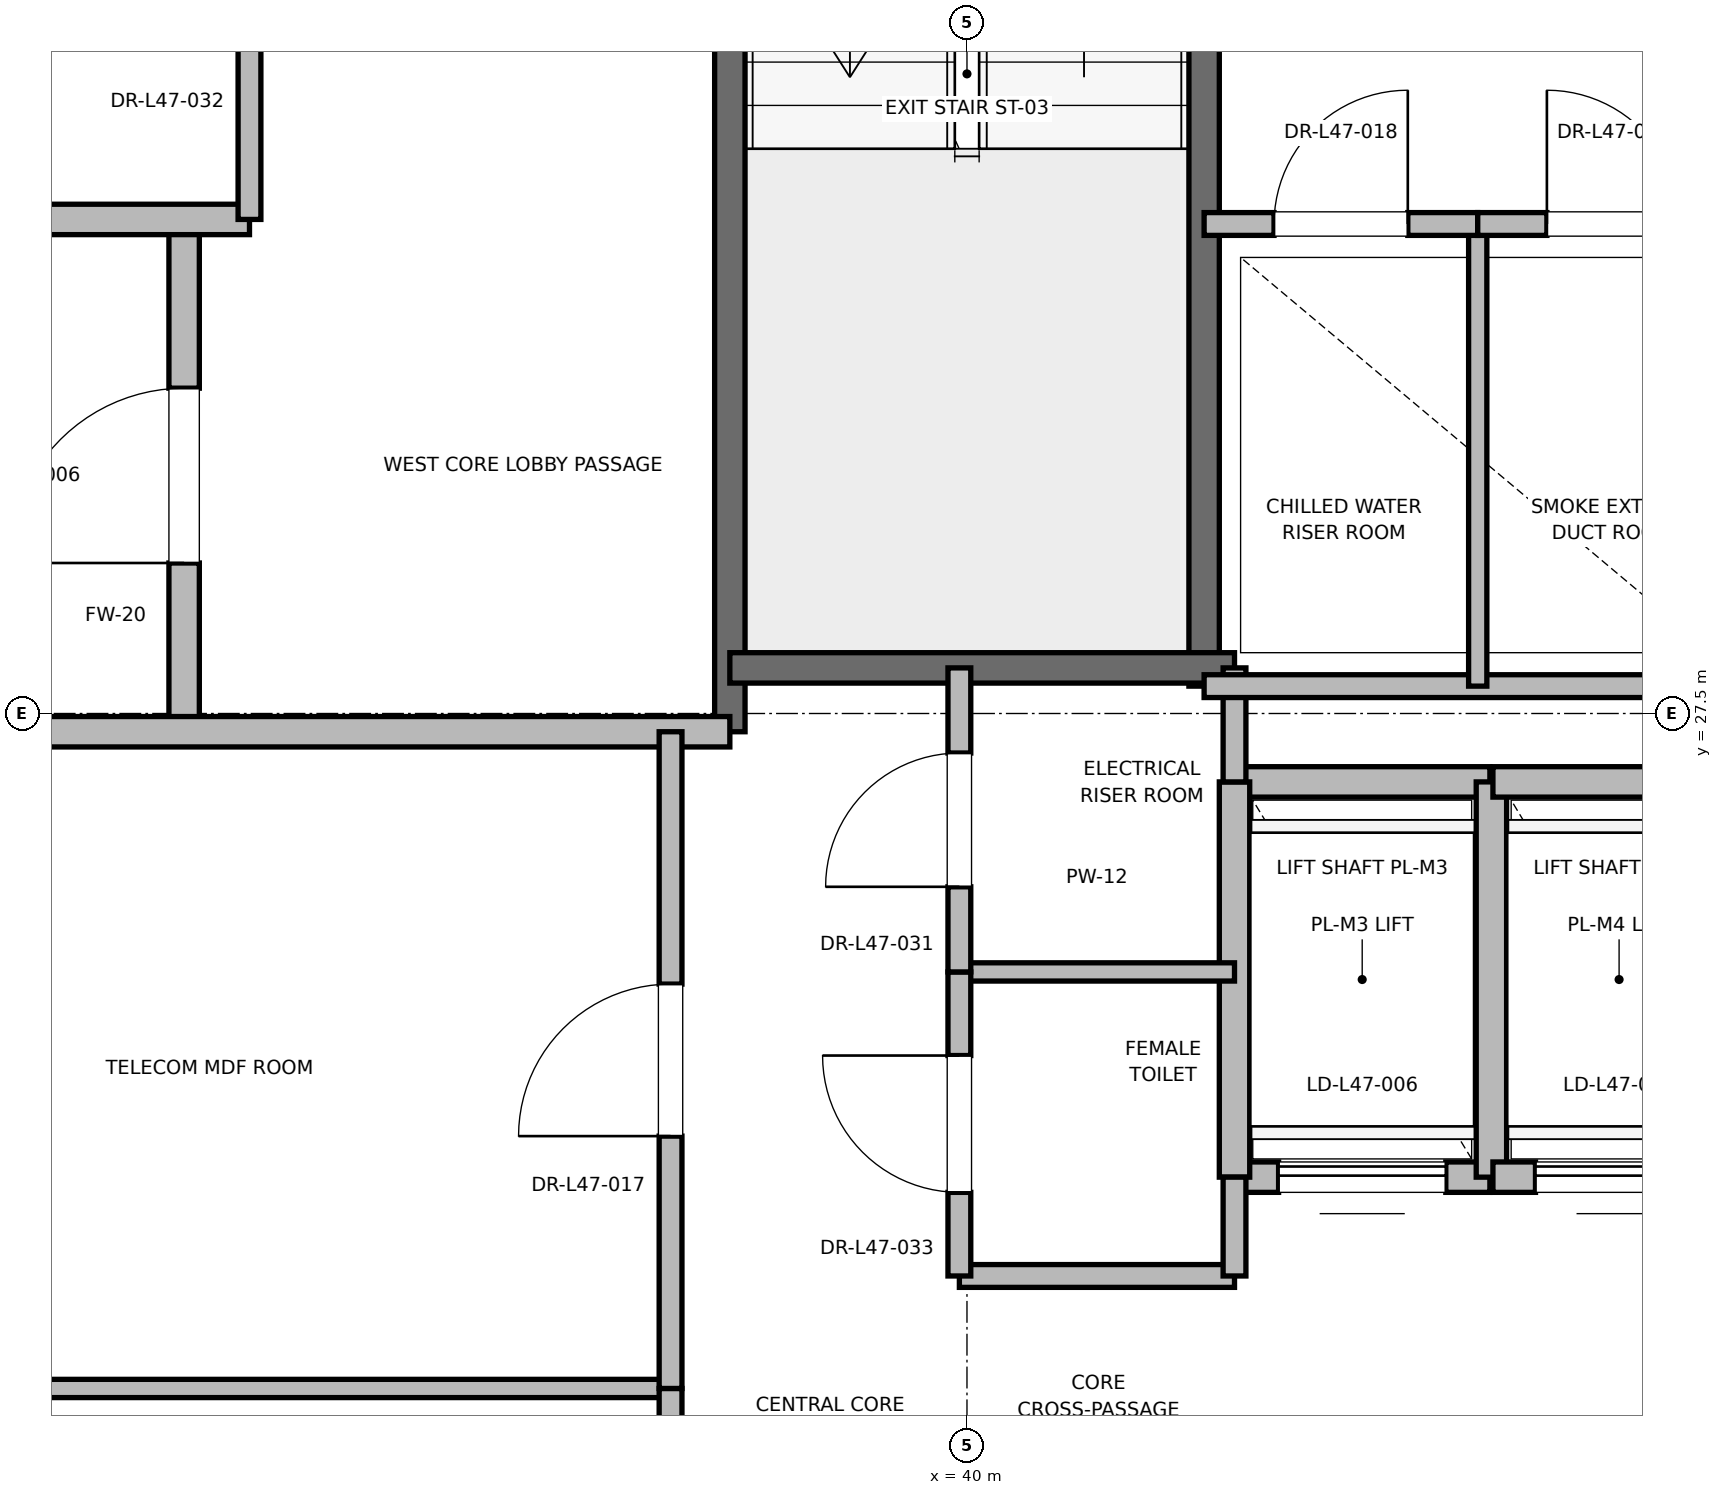
"""IFC4 building model, lengths in metres.
Left out: names, types, materials, properties, quantities, classifications, styles, units other than length and angle.
Written with IfcOpenShell. Run it as: python <this file> out.ifc"""

import sys

from ifc_helpers import new_model, si_unit, direction, frame, frame_2d, origin, place, context, subcontext, project, spatial, rectangle, extrude, element, fill, save


model = new_model("IFC4")
c1 = context("Model", 3, precision=1e-05, world=origin(), true_north=direction((0.0, 1.0)))
c2 = subcontext(c1, "Body", "Model", "MODEL_VIEW")
j1 = project(units=[si_unit("LENGTHUNIT", "METRE"), si_unit("PLANEANGLEUNIT", "RADIAN")], contexts=[c1])
p1 = place(None, origin())
s1 = spatial("IfcSite", under=j1, at=p1, CompositionType="ELEMENT")
p2 = place(p1, origin())
s2 = spatial("IfcBuilding", under=s1, at=p2, CompositionType="ELEMENT")
p3 = place(p2, frame((0.0, 0.0, 205.2)))
s3 = spatial("IfcBuildingStorey", under=s2, at=p3, CompositionType="ELEMENT", Elevation=205.2)
p4 = place(p3, frame((38.44, 27.38, 0.0), z_axis=(0.0, 0.0, 1.0), x_axis=(0.0, 1.0, 0.0)))
e1 = element("IfcWall", 1, at=p4, inside=s3, PredefinedType="SOLIDWALL", context=c2, shape_type="SweptSolid", body=[
    extrude(rectangle(XDim=8.87, YDim=0.2, at=frame_2d((4.435, 0.0))), origin(), (0.0, 0.0, 1.0), 3.775),
])
p5 = place(p3, frame((41.56, 27.68, 0.0), z_axis=(0.0, 0.0, 1.0), x_axis=(0.0, 1.0, 0.0)))
e2 = element("IfcWall", 2, at=p5, inside=s3, PredefinedType="SOLIDWALL", context=c2, shape_type="SweptSolid", body=[
    extrude(rectangle(XDim=8.57, YDim=0.2, at=frame_2d((4.285, 0.0))), origin(), (0.0, 0.0, 1.0), 3.775),
])
p6 = place(p3, frame((38.44, 27.8, 0.0), z_axis=(0.0, 0.0, 1.0), x_axis=(1.0, 0.0, 0.0)))
e3 = element("IfcWall", 3, at=p6, inside=s3, PredefinedType="SOLIDWALL", context=c2, shape_type="SweptSolid", body=[
    extrude(rectangle(XDim=3.32, YDim=0.2, at=frame_2d((1.66, 0.0))), origin(), (0.0, 0.0, 1.0), 3.775),
])
p7 = place(p3, frame((34.85, 27.38, 0.0), z_axis=(0.0, 0.0, 1.0), x_axis=(0.0, 1.0, 0.0)))
e4 = element("IfcWall", 4, at=p7, inside=s3, PredefinedType="PARTITIONING", context=c2, shape_type="SweptSolid", body=[
    extrude(rectangle(XDim=3.37, YDim=0.2, at=frame_2d((1.685, 0.0))), origin(), (0.0, 0.0, 1.0), 3.775),
])
p8 = place(p7, frame((1.11, 0.0, 0.0)))
e5 = element("IfcOpeningElement", 5, at=p8, cuts=e4, PredefinedType="OPENING", context=c2, shape_type="SweptSolid", body=[
    extrude(rectangle(XDim=1.15, YDim=2.2, at=frame_2d((0.575, 1.1))), frame((0.0, 0.1, 0.0), z_axis=(0.0, -1.0, 0.0), x_axis=(1.0, 0.0, 0.0)), (0.0, 0.0, 1.0), 0.2),
])
p9 = place(p3, frame((32.82, 27.38, 0.0), z_axis=(0.0, 0.0, 1.0), x_axis=(1.0, 0.0, 0.0)))
e6 = element("IfcWall", 6, at=p9, inside=s3, PredefinedType="PARTITIONING", context=c2, shape_type="SweptSolid", body=[
    extrude(rectangle(XDim=5.62, YDim=0.2, at=frame_2d((2.81, 0.0))), origin(), (0.0, 0.0, 1.0), 3.775),
])
p10 = place(p3, frame((32.15, 30.75, 0.0), z_axis=(0.0, 0.0, 1.0), x_axis=(1.0, 0.0, 0.0)))
e7 = element("IfcWall", 7, at=p10, inside=s3, PredefinedType="PARTITIONING", context=c2, shape_type="SweptSolid", body=[
    extrude(rectangle(XDim=3.13, YDim=0.2, at=frame_2d((1.565, 0.0))), origin(), (0.0, 0.0, 1.0), 3.775),
])
p11 = place(p3, frame((41.76, 24.45, 0.0), z_axis=(0.0, 0.0, 1.0), x_axis=(1.0, 0.0, 0.0)))
e8 = element("IfcWall", 8, at=p11, inside=s3, PredefinedType="SOLIDWALL", context=c2, shape_type="SweptSolid", body=[
    extrude(rectangle(XDim=1.68, YDim=0.2, at=frame_2d((0.84, 0.0))), origin(), (0.0, 0.0, 1.0), 3.775),
])
p12 = place(p11, frame((0.29, 0.0, 0.0)))
e9 = element("IfcOpeningElement", 9, at=p12, cuts=e8, PredefinedType="OPENING", context=c2, shape_type="SweptSolid", body=[
    extrude(rectangle(XDim=1.1, YDim=2.2, at=frame_2d((0.55, 1.1))), frame((0.0, 0.1, 0.0), z_axis=(0.0, -1.0, 0.0), x_axis=(1.0, 0.0, 0.0)), (0.0, 0.0, 1.0), 0.2),
])
p13 = place(p3, frame((43.44, 27.05, 0.0), z_axis=(0.0, 0.0, 1.0), x_axis=(-1.0, 0.0, 0.0)))
e10 = element("IfcWall", 10, at=p13, inside=s3, PredefinedType="SOLIDWALL", context=c2, shape_type="SweptSolid", body=[
    extrude(rectangle(XDim=1.68, YDim=0.2, at=frame_2d((0.84, 0.0))), origin(), (0.0, 0.0, 1.0), 3.775),
])
for number, where, z_axis, x_axis in (
    (11, (41.76, 27.05, 0.0), (0.0, 0.0, 1.0), (0.0, -1.0, 0.0)),
    (12, (43.45, 24.45, 0.0), (0.0, 0.0, 1.0), (0.0, 1.0, 0.0)),
):
    element("IfcWall", number, at=place(p3, frame(where, z_axis=z_axis, x_axis=x_axis)), inside=s3, PredefinedType="SOLIDWALL", context=c2, shape_type="SweptSolid", body=[
        extrude(rectangle(XDim=2.6, YDim=0.2, at=frame_2d((1.3, 0.0))), origin(), (0.0, 0.0, 1.0), 3.775),
    ])
p14 = place(p3, frame((43.46, 24.45, 0.0), z_axis=(0.0, 0.0, 1.0), x_axis=(1.0, 0.0, 0.0)))
e13 = element("IfcWall", 13, at=p14, inside=s3, PredefinedType="SOLIDWALL", context=c2, shape_type="SweptSolid", body=[
    extrude(rectangle(XDim=1.66, YDim=0.2, at=frame_2d((0.83, 0.0))), origin(), (0.0, 0.0, 1.0), 3.775),
])
p15 = place(p14, frame((0.28, 0.0, 0.0)))
e14 = element("IfcOpeningElement", 14, at=p15, cuts=e13, PredefinedType="OPENING", context=c2, shape_type="SweptSolid", body=[
    extrude(rectangle(XDim=1.1, YDim=2.2, at=frame_2d((0.55, 1.1))), frame((0.0, 0.1, 0.0), z_axis=(0.0, -1.0, 0.0), x_axis=(1.0, 0.0, 0.0)), (0.0, 0.0, 1.0), 0.2),
])
p16 = place(p3, frame((45.12, 27.05, 0.0), z_axis=(0.0, 0.0, 1.0), x_axis=(-1.0, 0.0, 0.0)))
e15 = element("IfcWall", 15, at=p16, inside=s3, PredefinedType="SOLIDWALL", context=c2, shape_type="SweptSolid", body=[
    extrude(rectangle(XDim=1.66, YDim=0.2, at=frame_2d((0.83, 0.0))), origin(), (0.0, 0.0, 1.0), 3.775),
])
p17 = place(p3, frame((39.95, 23.8, 0.0), z_axis=(0.0, 0.0, 1.0), x_axis=(1.0, 0.0, 0.0)))
e16 = element("IfcWall", 16, at=p17, inside=s3, PredefinedType="PARTITIONING", context=c2, shape_type="SweptSolid", body=[
    extrude(rectangle(XDim=1.81, YDim=0.15, at=frame_2d((0.905, 0.0))), origin(), (0.0, 0.0, 1.0), 2.85),
])
p18 = place(p3, frame((39.95, 25.8, 0.0), z_axis=(0.0, 0.0, 1.0), x_axis=(1.0, 0.0, 0.0)))
e17 = element("IfcWall", 17, at=p18, inside=s3, PredefinedType="PARTITIONING", context=c2, shape_type="SweptSolid", body=[
    extrude(rectangle(XDim=1.81, YDim=0.12, at=frame_2d((0.905, 0.0))), origin(), (0.0, 0.0, 1.0), 2.85),
])
p19 = place(p3, frame((41.76, 23.8, 0.0), z_axis=(0.0, 0.0, 1.0), x_axis=(0.0, 1.0, 0.0)))
e18 = element("IfcWall", 18, at=p19, inside=s3, PredefinedType="PARTITIONING", context=c2, shape_type="SweptSolid", body=[
    extrude(rectangle(XDim=0.65, YDim=0.15, at=frame_2d((0.325, 0.0))), origin(), (0.0, 0.0, 1.0), 2.85),
])
p20 = place(p3, frame((41.76, 27.05, 0.0), z_axis=(0.0, 0.0, 1.0), x_axis=(0.0, 1.0, 0.0)))
e19 = element("IfcWall", 19, at=p20, inside=s3, PredefinedType="PARTITIONING", context=c2, shape_type="SweptSolid", body=[
    extrude(rectangle(XDim=0.75, YDim=0.15, at=frame_2d((0.375, 0.0))), origin(), (0.0, 0.0, 1.0), 2.85),
])
p21 = place(p3, frame((39.95, 23.8, 0.0), z_axis=(0.0, 0.0, 1.0), x_axis=(0.0, 1.0, 0.0)))
e20 = element("IfcWall", 20, at=p21, inside=s3, PredefinedType="PARTITIONING", context=c2, shape_type="SweptSolid", body=[
    extrude(rectangle(XDim=2.0, YDim=0.15, at=frame_2d((1.0, 0.0))), origin(), (0.0, 0.0, 1.0), 2.85),
])
p22 = place(p21, frame((0.55, 0.0, 0.0)))
e21 = element("IfcOpeningElement", 21, at=p22, cuts=e20, PredefinedType="OPENING", context=c2, shape_type="SweptSolid", body=[
    extrude(rectangle(XDim=0.9, YDim=2.1, at=frame_2d((0.45, 1.05))), frame((0.0, 0.075, 0.0), z_axis=(0.0, -1.0, 0.0), x_axis=(1.0, 0.0, 0.0)), (0.0, 0.0, 1.0), 0.15),
])
p23 = place(p3, frame((39.95, 25.8, 0.0), z_axis=(0.0, 0.0, 1.0), x_axis=(0.0, 1.0, 0.0)))
e22 = element("IfcWall", 22, at=p23, inside=s3, PredefinedType="PARTITIONING", context=c2, shape_type="SweptSolid", body=[
    extrude(rectangle(XDim=2.0, YDim=0.15, at=frame_2d((1.0, 0.0))), origin(), (0.0, 0.0, 1.0), 2.85),
])
p24 = place(p23, frame((0.56, 0.0, 0.0)))
e23 = element("IfcOpeningElement", 23, at=p24, cuts=e22, PredefinedType="OPENING", context=c2, shape_type="SweptSolid", body=[
    extrude(rectangle(XDim=0.88, YDim=2.1, at=frame_2d((0.44, 1.05))), frame((0.0, 0.075, 0.0), z_axis=(0.0, -1.0, 0.0), x_axis=(1.0, 0.0, 0.0)), (0.0, 0.0, 1.0), 0.15),
])
p25 = place(p3, frame((35.28, 30.75, 0.0), z_axis=(0.0, 0.0, 1.0), x_axis=(0.0, 1.0, 0.0)))
e24 = element("IfcWall", 24, at=p25, inside=s3, PredefinedType="PARTITIONING", context=c2, shape_type="SweptSolid", body=[
    extrude(rectangle(XDim=3.2, YDim=0.15, at=frame_2d((1.6, 0.0))), origin(), (0.0, 0.0, 1.0), 2.85),
])
p26 = place(p25, frame((1.15, 0.0, 0.0)))
e25 = element("IfcOpeningElement", 25, at=p26, cuts=e24, PredefinedType="OPENING", context=c2, shape_type="SweptSolid", body=[
    extrude(rectangle(XDim=0.9, YDim=2.1, at=frame_2d((0.45, 1.05))), frame((0.0, 0.075, 0.0), z_axis=(0.0, -1.0, 0.0), x_axis=(1.0, 0.0, 0.0)), (0.0, 0.0, 1.0), 0.15),
])
p27 = place(p3, frame((32.82, 23.06, 0.0), z_axis=(0.0, 0.0, 1.0), x_axis=(1.0, 0.0, 0.0)))
e26 = element("IfcWall", 26, at=p27, inside=s3, PredefinedType="PARTITIONING", context=c2, shape_type="SweptSolid", body=[
    extrude(rectangle(XDim=5.23, YDim=0.12, at=frame_2d((2.615, 0.0))), origin(), (0.0, 0.0, 1.0), 2.85),
])
p28 = place(p3, frame((38.05, 18.6, 0.0), z_axis=(0.0, 0.0, 1.0), x_axis=(0.0, 1.0, 0.0)))
e27 = element("IfcWall", 27, at=p28, inside=s3, PredefinedType="PARTITIONING", context=c2, shape_type="SweptSolid", body=[
    extrude(rectangle(XDim=4.46, YDim=0.15, at=frame_2d((2.23, 0.0))), origin(), (0.0, 0.0, 1.0), 2.755),
])
p29 = place(p28, frame((1.73, 0.0, 0.0)))
e28 = element("IfcOpeningElement", 28, at=p29, cuts=e27, PredefinedType="OPENING", context=c2, shape_type="SweptSolid", body=[
    extrude(rectangle(XDim=1.0, YDim=2.15, at=frame_2d((0.5, 1.075))), frame((0.0, 0.075, 0.0), z_axis=(0.0, -1.0, 0.0), x_axis=(1.0, 0.0, 0.0)), (0.0, 0.0, 1.0), 0.15),
])
p30 = place(p3, frame((38.05, 23.06, 0.0), z_axis=(0.0, 0.0, 1.0), x_axis=(0.0, 1.0, 0.0)))
e29 = element("IfcWall", 29, at=p30, inside=s3, PredefinedType="PARTITIONING", context=c2, shape_type="SweptSolid", body=[
    extrude(rectangle(XDim=4.32, YDim=0.15, at=frame_2d((2.16, 0.0))), origin(), (0.0, 0.0, 1.0), 2.85),
])
p31 = place(p30, frame((1.66, 0.0, 0.0)))
e30 = element("IfcOpeningElement", 30, at=p31, cuts=e29, PredefinedType="OPENING", context=c2, shape_type="SweptSolid", body=[
    extrude(rectangle(XDim=1.0, YDim=2.15, at=frame_2d((0.5, 1.075))), frame((0.0, 0.075, 0.0), z_axis=(0.0, -1.0, 0.0), x_axis=(1.0, 0.0, 0.0)), (0.0, 0.0, 1.0), 0.15),
])
p32 = place(p3, frame((41.56, 27.68, 0.0), z_axis=(0.0, 0.0, 1.0), x_axis=(1.0, 0.0, 0.0)))
e31 = element("IfcWall", 31, at=p32, inside=s3, PredefinedType="PARTITIONING", context=c2, shape_type="SweptSolid", body=[
    extrude(rectangle(XDim=3.59, YDim=0.15, at=frame_2d((1.795, 0.0))), origin(), (0.0, 0.0, 1.0), 2.85),
])
p33 = place(p3, frame((43.36, 27.68, 0.0), z_axis=(0.0, 0.0, 1.0), x_axis=(0.0, 1.0, 0.0)))
e32 = element("IfcWall", 32, at=p33, inside=s3, PredefinedType="PARTITIONING", context=c2, shape_type="SweptSolid", body=[
    extrude(rectangle(XDim=3.04, YDim=0.12, at=frame_2d((1.52, 0.0))), origin(), (0.0, 0.0, 1.0), 2.85),
])
p34 = place(p3, frame((41.56, 30.72, 0.0), z_axis=(0.0, 0.0, 1.0), x_axis=(1.0, 0.0, 0.0)))
e33 = element("IfcWall", 33, at=p34, inside=s3, PredefinedType="PARTITIONING", context=c2, shape_type="SweptSolid", body=[
    extrude(rectangle(XDim=1.8, YDim=0.15, at=frame_2d((0.9, 0.0))), origin(), (0.0, 0.0, 1.0), 2.85),
])
p35 = place(p34, frame((0.46, 0.0, 0.0)))
e34 = element("IfcOpeningElement", 34, at=p35, cuts=e33, PredefinedType="OPENING", context=c2, shape_type="SweptSolid", body=[
    extrude(rectangle(XDim=0.88, YDim=2.1, at=frame_2d((0.44, 1.05))), frame((0.0, 0.075, 0.0), z_axis=(0.0, -1.0, 0.0), x_axis=(1.0, 0.0, 0.0)), (0.0, 0.0, 1.0), 0.15),
])
p36 = place(p3, frame((43.36, 30.72, 0.0), z_axis=(0.0, 0.0, 1.0), x_axis=(1.0, 0.0, 0.0)))
e35 = element("IfcWall", 35, at=p36, inside=s3, PredefinedType="PARTITIONING", context=c2, shape_type="SweptSolid", body=[
    extrude(rectangle(XDim=1.79, YDim=0.15, at=frame_2d((0.895, 0.0))), origin(), (0.0, 0.0, 1.0), 2.85),
])
p37 = place(p36, frame((0.455, 0.0, 0.0)))
e36 = element("IfcOpeningElement", 36, at=p37, cuts=e35, PredefinedType="OPENING", context=c2, shape_type="SweptSolid", body=[
    extrude(rectangle(XDim=0.88, YDim=2.1, at=frame_2d((0.44, 1.05))), frame((0.0, 0.075, 0.0), z_axis=(0.0, -1.0, 0.0), x_axis=(1.0, 0.0, 0.0)), (0.0, 0.0, 1.0), 0.15),
])
p38 = place(p8, origin())
e37 = element("IfcDoor", 37, at=p38, inside=s3, OperationType="SINGLE_SWING_LEFT", PredefinedType="DOOR", context=c2, shape_type="SweptSolid", body=[
    extrude(rectangle(XDim=1.15, YDim=2.2, at=frame_2d((0.575, 1.1))), frame((0.0, 0.025, 0.0), z_axis=(0.0, -1.0, 0.0), x_axis=(1.0, 0.0, 0.0)), (0.0, 0.0, 1.0), 0.05),
])
fill(e5, e37)
p39 = place(p12, origin())
e38 = element("IfcDoor", 38, at=p39, inside=s3, OperationType="SLIDING_TO_RIGHT", PredefinedType="DOOR", context=c2, shape_type="SweptSolid", body=[
    extrude(rectangle(XDim=1.1, YDim=2.2, at=frame_2d((0.55, 1.1))), frame((0.0, 0.025, 0.0), z_axis=(0.0, -1.0, 0.0), x_axis=(1.0, 0.0, 0.0)), (0.0, 0.0, 1.0), 0.05),
])
fill(e9, e38)
p40 = place(p15, origin())
e39 = element("IfcDoor", 39, at=p40, inside=s3, OperationType="SLIDING_TO_RIGHT", PredefinedType="DOOR", context=c2, shape_type="SweptSolid", body=[
    extrude(rectangle(XDim=1.1, YDim=2.2, at=frame_2d((0.55, 1.1))), frame((0.0, 0.025, 0.0), z_axis=(0.0, -1.0, 0.0), x_axis=(1.0, 0.0, 0.0)), (0.0, 0.0, 1.0), 0.05),
])
fill(e14, e39)
p41 = place(p22, origin())
e40 = element("IfcDoor", 40, at=p41, inside=s3, OperationType="SINGLE_SWING_RIGHT", PredefinedType="DOOR", context=c2, shape_type="SweptSolid", body=[
    extrude(rectangle(XDim=0.9, YDim=2.1, at=frame_2d((0.45, 1.05))), frame((0.0, 0.025, 0.0), z_axis=(0.0, -1.0, 0.0), x_axis=(1.0, 0.0, 0.0)), (0.0, 0.0, 1.0), 0.05),
])
fill(e21, e40)
p42 = place(p24, origin())
e41 = element("IfcDoor", 41, at=p42, inside=s3, OperationType="SINGLE_SWING_LEFT", PredefinedType="DOOR", context=c2, shape_type="SweptSolid", body=[
    extrude(rectangle(XDim=0.88, YDim=2.1, at=frame_2d((0.44, 1.05))), frame((0.0, 0.025, 0.0), z_axis=(0.0, -1.0, 0.0), x_axis=(1.0, 0.0, 0.0)), (0.0, 0.0, 1.0), 0.05),
])
fill(e23, e41)
p43 = place(p31, origin())
e42 = element("IfcDoor", 42, at=p43, inside=s3, OperationType="SINGLE_SWING_LEFT", PredefinedType="DOOR", context=c2, shape_type="SweptSolid", body=[
    extrude(rectangle(XDim=1.0, YDim=2.15, at=frame_2d((0.5, 1.075))), frame((0.0, 0.025, 0.0), z_axis=(0.0, -1.0, 0.0), x_axis=(1.0, 0.0, 0.0)), (0.0, 0.0, 1.0), 0.05),
])
fill(e30, e42)
p44 = place(p35, origin())
e43 = element("IfcDoor", 43, at=p44, inside=s3, OperationType="SINGLE_SWING_RIGHT", PredefinedType="DOOR", context=c2, shape_type="SweptSolid", body=[
    extrude(rectangle(XDim=0.88, YDim=2.1, at=frame_2d((0.44, 1.05))), frame((0.0, 0.025, 0.0), z_axis=(0.0, -1.0, 0.0), x_axis=(1.0, 0.0, 0.0)), (0.0, 0.0, 1.0), 0.05),
])
fill(e34, e43)
p45 = place(p37, origin())
e44 = element("IfcDoor", 44, at=p45, inside=s3, OperationType="SINGLE_SWING_LEFT", PredefinedType="DOOR", context=c2, shape_type="SweptSolid", body=[
    extrude(rectangle(XDim=0.88, YDim=2.1, at=frame_2d((0.44, 1.05))), frame((0.0, 0.025, 0.0), z_axis=(0.0, -1.0, 0.0), x_axis=(1.0, 0.0, 0.0)), (0.0, 0.0, 1.0), 0.05),
])
fill(e36, e44)
save(model, sys.argv[1])
